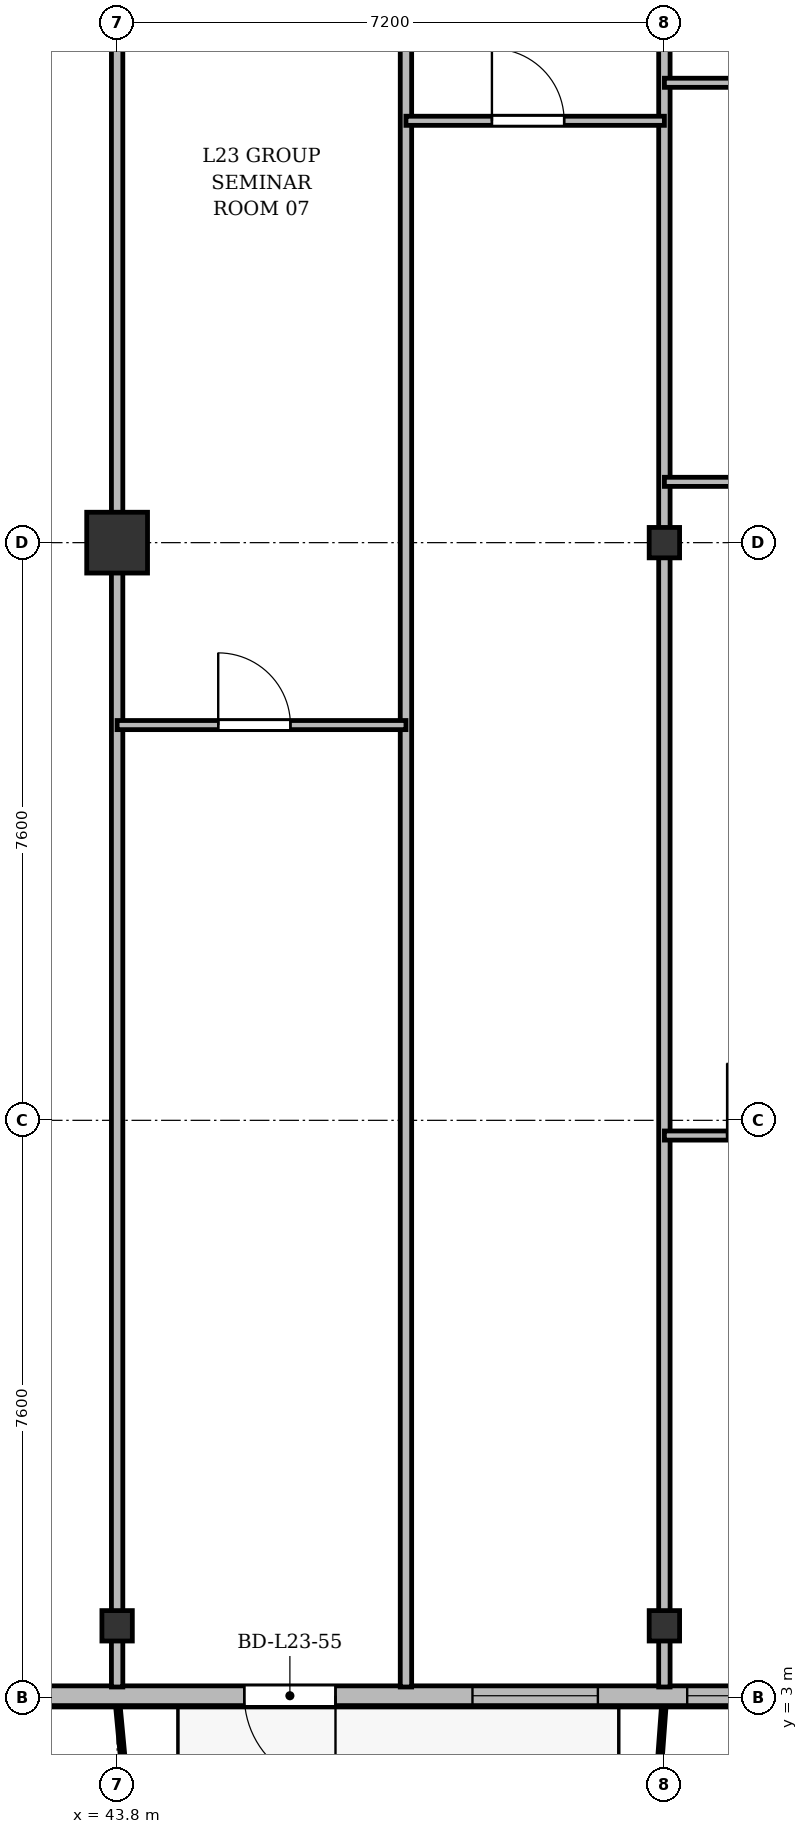
"""IFC4 building model, lengths in metres.
Left out: names, types, materials, properties, quantities, classifications, styles, units other than length and angle.
Written with IfcOpenShell. Run it as: python <this file> out.ifc"""

import sys

from ifc_helpers import new_model, si_unit, direction, frame, frame_2d, origin, origin_2d, place, context, subcontext, project, spatial, rectangle, i_section, extrude, source, transform, mapped, element, fill, save


model = new_model("IFC4")
c1 = context("Model", 3, precision=1e-05, world=origin(), true_north=direction((0.0, 1.0)))
c2 = subcontext(c1, "Body", "Model", "MODEL_VIEW")
j1 = project(units=[si_unit("LENGTHUNIT", "METRE"), si_unit("PLANEANGLEUNIT", "RADIAN")], contexts=[c1])
p1 = place(None, origin())
s1 = spatial("IfcSite", under=j1, at=p1, CompositionType="ELEMENT")
p2 = place(p1, origin())
s2 = spatial("IfcBuilding", under=s1, at=p2, CompositionType="ELEMENT")
p3 = place(p2, frame((0.0, 0.0, 92.5)))
s3 = spatial("IfcBuildingStorey", under=s2, at=p3, CompositionType="ELEMENT", Elevation=92.5)
m1 = source(origin(), c2, "Body", "SweptSolid", [
    extrude(i_section(OverallWidth=0.4, OverallDepth=0.4, WebThickness=0.022, FlangeThickness=0.035, at=origin_2d()), origin(), (0.0, 0.0, 1.0), 3.6),
])
p4 = place(p3, frame((43.8, 3.95, 0.0), z_axis=(0.0, 0.0, 1.0), x_axis=(1.0, 0.0, 0.0)))
e1 = element("IfcColumn", 1, at=p4, inside=s3, PredefinedType="COLUMN", context=c2, shape_type="MappedRepresentation", body=[
    mapped(m1, transform((0.0, 0.0, 0.0), x_axis=(1.0, 0.0, 0.0), y_axis=(0.0, 1.0, 0.0), z_axis=(0.0, 0.0, 1.0), scale=1.0)),
])
m2 = source(origin(), c2, "Body", "SweptSolid", [
    extrude(rectangle(XDim=0.8, YDim=0.8, at=origin_2d()), origin(), (0.0, 0.0, 1.0), 3.6),
])
p5 = place(p3, frame((43.8, 18.2, 0.0), z_axis=(0.0, 0.0, 1.0), x_axis=(1.0, 0.0, 0.0)))
e2 = element("IfcColumn", 2, at=p5, inside=s3, PredefinedType="COLUMN", context=c2, shape_type="MappedRepresentation", body=[
    mapped(m2, transform((0.0, 0.0, 0.0), x_axis=(1.0, 0.0, 0.0), y_axis=(0.0, 1.0, 0.0), z_axis=(0.0, 0.0, 1.0), scale=1.0)),
])
for number, where, z_axis, x_axis in (
    (3, (51.0, 3.95, 0.0), (0.0, 0.0, 1.0), (1.0, 0.0, 0.0)),
    (4, (51.0, 18.2, 0.0), (0.0, 0.0, 1.0), (1.0, 0.0, 0.0)),
):
    element("IfcColumn", number, at=place(p3, frame(where, z_axis=z_axis, x_axis=x_axis)), inside=s3, PredefinedType="COLUMN", context=c2, shape_type="MappedRepresentation", body=[
        mapped(m1, transform((0.0, 0.0, 0.0), x_axis=(1.0, 0.0, 0.0), y_axis=(0.0, 1.0, 0.0), z_axis=(0.0, 0.0, 1.0), scale=1.0)),
    ])
p6 = place(p3, frame((66.9, 3.03, 0.0), z_axis=(0.0, 0.0, 1.0), x_axis=(-1.0, 0.0, 0.0)))
e5 = element("IfcWall", 5, at=p6, inside=s3, PredefinedType="SOLIDWALL", context=c2, shape_type="SweptSolid", body=[
    extrude(rectangle(XDim=59.4, YDim=0.26, at=frame_2d((29.7, 0.0))), origin(), (0.0, 0.0, 1.0), 3.34),
])
p7 = place(p6, frame((2.175, 0.0, 0.9)))
e6 = element("IfcOpeningElement", 6, at=p7, cuts=e5, PredefinedType="OPENING", context=c2, shape_type="SweptSolid", body=[
    extrude(rectangle(XDim=1.65, YDim=1.85, at=frame_2d((0.825, 0.925))), frame((0.0, 0.14, 0.0), z_axis=(0.0, -1.0, 0.0), x_axis=(1.0, 0.0, 0.0)), (0.0, 0.0, 1.0), 0.28),
])
p8 = place(p6, frame((5.5, 0.0, 0.9)))
e7 = element("IfcOpeningElement", 7, at=p8, cuts=e5, PredefinedType="OPENING", context=c2, shape_type="SweptSolid", body=[
    extrude(rectangle(XDim=1.8, YDim=1.8, at=frame_2d((0.9, 0.9))), frame((0.0, 0.14, 0.0), z_axis=(0.0, -1.0, 0.0), x_axis=(1.0, 0.0, 0.0)), (0.0, 0.0, 1.0), 0.28),
])
p9 = place(p6, frame((8.65, 0.0, 0.9)))
e8 = element("IfcOpeningElement", 8, at=p9, cuts=e5, PredefinedType="OPENING", context=c2, shape_type="SweptSolid", body=[
    extrude(rectangle(XDim=1.5, YDim=1.75, at=frame_2d((0.75, 0.875))), frame((0.0, 0.14, 0.0), z_axis=(0.0, -1.0, 0.0), x_axis=(1.0, 0.0, 0.0)), (0.0, 0.0, 1.0), 0.28),
])
p10 = place(p6, frame((11.25, 0.0, 0.9)))
e9 = element("IfcOpeningElement", 9, at=p10, cuts=e5, PredefinedType="OPENING", context=c2, shape_type="SweptSolid", body=[
    extrude(rectangle(XDim=1.5, YDim=1.75, at=frame_2d((0.75, 0.875))), frame((0.0, 0.14, 0.0), z_axis=(0.0, -1.0, 0.0), x_axis=(1.0, 0.0, 0.0)), (0.0, 0.0, 1.0), 0.28),
])
p11 = place(p6, frame((13.6, 0.0, 0.9)))
e10 = element("IfcOpeningElement", 10, at=p11, cuts=e5, PredefinedType="OPENING", context=c2, shape_type="SweptSolid", body=[
    extrude(rectangle(XDim=2.0, YDim=1.95, at=frame_2d((1.0, 0.975))), frame((0.0, 0.14, 0.0), z_axis=(0.0, -1.0, 0.0), x_axis=(1.0, 0.0, 0.0)), (0.0, 0.0, 1.0), 0.28),
])
p12 = place(p6, frame((16.775, 0.0, 0.9)))
e11 = element("IfcOpeningElement", 11, at=p12, cuts=e5, PredefinedType="OPENING", context=c2, shape_type="SweptSolid", body=[
    extrude(rectangle(XDim=1.65, YDim=1.85, at=frame_2d((0.825, 0.925))), frame((0.0, 0.14, 0.0), z_axis=(0.0, -1.0, 0.0), x_axis=(1.0, 0.0, 0.0)), (0.0, 0.0, 1.0), 0.28),
])
p13 = place(p6, frame((20.227, 0.0, 0.0)))
e12 = element("IfcOpeningElement", 12, at=p13, cuts=e5, PredefinedType="OPENING", context=c2, shape_type="SweptSolid", body=[
    extrude(rectangle(XDim=1.2, YDim=2.2, at=frame_2d((0.6, 1.1))), frame((0.0, 0.14, 0.0), z_axis=(0.0, -1.0, 0.0), x_axis=(1.0, 0.0, 0.0)), (0.0, 0.0, 1.0), 0.28),
])
p14 = place(p6, frame((28.6, 0.0, 0.9)))
e13 = element("IfcOpeningElement", 13, at=p14, cuts=e5, PredefinedType="OPENING", context=c2, shape_type="SweptSolid", body=[
    extrude(rectangle(XDim=2.2, YDim=1.8, at=frame_2d((1.1, 0.9))), frame((0.0, 0.14, 0.0), z_axis=(0.0, -1.0, 0.0), x_axis=(1.0, 0.0, 0.0)), (0.0, 0.0, 1.0), 0.28),
])
p15 = place(p6, frame((36.75, 0.0, 0.9)))
e14 = element("IfcOpeningElement", 14, at=p15, cuts=e5, PredefinedType="OPENING", context=c2, shape_type="SweptSolid", body=[
    extrude(rectangle(XDim=1.5, YDim=1.75, at=frame_2d((0.75, 0.875))), frame((0.0, 0.14, 0.0), z_axis=(0.0, -1.0, 0.0), x_axis=(1.0, 0.0, 0.0)), (0.0, 0.0, 1.0), 0.28),
])
p16 = place(p6, frame((39.15, 0.0, 0.9)))
e15 = element("IfcOpeningElement", 15, at=p16, cuts=e5, PredefinedType="OPENING", context=c2, shape_type="SweptSolid", body=[
    extrude(rectangle(XDim=1.5, YDim=1.75, at=frame_2d((0.75, 0.875))), frame((0.0, 0.14, 0.0), z_axis=(0.0, -1.0, 0.0), x_axis=(1.0, 0.0, 0.0)), (0.0, 0.0, 1.0), 0.28),
])
p17 = place(p6, frame((41.475, 0.0, 0.9)))
e16 = element("IfcOpeningElement", 16, at=p17, cuts=e5, PredefinedType="OPENING", context=c2, shape_type="SweptSolid", body=[
    extrude(rectangle(XDim=1.65, YDim=1.85, at=frame_2d((0.825, 0.925))), frame((0.0, 0.14, 0.0), z_axis=(0.0, -1.0, 0.0), x_axis=(1.0, 0.0, 0.0)), (0.0, 0.0, 1.0), 0.28),
])
p18 = place(p6, frame((45.36, 0.0, 0.0)))
e17 = element("IfcOpeningElement", 17, at=p18, cuts=e5, PredefinedType="OPENING", context=c2, shape_type="SweptSolid", body=[
    extrude(rectangle(XDim=1.2, YDim=2.2, at=frame_2d((0.6, 1.1))), frame((0.0, 0.14, 0.0), z_axis=(0.0, -1.0, 0.0), x_axis=(1.0, 0.0, 0.0)), (0.0, 0.0, 1.0), 0.28),
])
p19 = place(p6, frame((48.2, 0.0, 0.9)))
e18 = element("IfcOpeningElement", 18, at=p19, cuts=e5, PredefinedType="OPENING", context=c2, shape_type="SweptSolid", body=[
    extrude(rectangle(XDim=2.2, YDim=1.8, at=frame_2d((1.1, 0.9))), frame((0.0, 0.14, 0.0), z_axis=(0.0, -1.0, 0.0), x_axis=(1.0, 0.0, 0.0)), (0.0, 0.0, 1.0), 0.28),
])
p20 = place(p6, frame((52.25, 0.0, 0.9)))
e19 = element("IfcOpeningElement", 19, at=p20, cuts=e5, PredefinedType="OPENING", context=c2, shape_type="SweptSolid", body=[
    extrude(rectangle(XDim=1.5, YDim=1.75, at=frame_2d((0.75, 0.875))), frame((0.0, 0.14, 0.0), z_axis=(0.0, -1.0, 0.0), x_axis=(1.0, 0.0, 0.0)), (0.0, 0.0, 1.0), 0.28),
])
p21 = place(p6, frame((55.4, 0.0, 0.9)))
e20 = element("IfcOpeningElement", 20, at=p21, cuts=e5, PredefinedType="OPENING", context=c2, shape_type="SweptSolid", body=[
    extrude(rectangle(XDim=2.0, YDim=1.95, at=frame_2d((1.0, 0.975))), frame((0.0, 0.14, 0.0), z_axis=(0.0, -1.0, 0.0), x_axis=(1.0, 0.0, 0.0)), (0.0, 0.0, 1.0), 0.28),
])
p22 = place(p3, frame((43.8, 3.145, 0.0), z_axis=(0.0, 0.0, 1.0), x_axis=(0.0, 1.0, 0.0)))
e21 = element("IfcWall", 21, at=p22, inside=s3, PredefinedType="PARTITIONING", context=c2, shape_type="SweptSolid", body=[
    extrude(rectangle(XDim=24.455, YDim=0.15, at=frame_2d((12.228, 0.0))), origin(), (0.0, 0.0, 1.0), 2.84),
])
p23 = place(p3, frame((47.6, 3.145, 0.0), z_axis=(0.0, 0.0, 1.0), x_axis=(0.0, 1.0, 0.0)))
e22 = element("IfcWall", 22, at=p23, inside=s3, PredefinedType="PARTITIONING", context=c2, shape_type="SweptSolid", body=[
    extrude(rectangle(XDim=24.455, YDim=0.15, at=frame_2d((12.228, 0.0))), origin(), (0.0, 0.0, 1.0), 2.752),
])
p24 = place(p3, frame((51.0, 3.145, 0.0), z_axis=(0.0, 0.0, 1.0), x_axis=(0.0, 1.0, 0.0)))
e23 = element("IfcWall", 23, at=p24, inside=s3, PredefinedType="PARTITIONING", context=c2, shape_type="SweptSolid", body=[
    extrude(rectangle(XDim=24.455, YDim=0.15, at=frame_2d((12.228, 0.0))), origin(), (0.0, 0.0, 1.0), 2.84),
])
p25 = place(p3, frame((43.8, 15.8, 0.0), z_axis=(0.0, 0.0, 1.0), x_axis=(1.0, 0.0, 0.0)))
e24 = element("IfcWall", 24, at=p25, inside=s3, PredefinedType="PARTITIONING", context=c2, shape_type="SweptSolid", body=[
    extrude(rectangle(XDim=3.8, YDim=0.12, at=frame_2d((1.9, 0.0))), origin(), (0.0, 0.0, 1.0), 2.84),
])
p26 = place(p25, frame((1.33, 0.0, 0.0)))
e25 = element("IfcOpeningElement", 25, at=p26, cuts=e24, PredefinedType="OPENING", context=c2, shape_type="SweptSolid", body=[
    extrude(rectangle(XDim=0.95, YDim=2.15, at=frame_2d((0.475, 1.075))), frame((0.0, 0.07, 0.0), z_axis=(0.0, -1.0, 0.0), x_axis=(1.0, 0.0, 0.0)), (0.0, 0.0, 1.0), 0.14),
])
p27 = place(p3, frame((47.6, 23.75, 0.0), z_axis=(0.0, 0.0, 1.0), x_axis=(1.0, 0.0, 0.0)))
e26 = element("IfcWall", 26, at=p27, inside=s3, PredefinedType="PARTITIONING", context=c2, shape_type="SweptSolid", body=[
    extrude(rectangle(XDim=3.4, YDim=0.12, at=frame_2d((1.7, 0.0))), origin(), (0.0, 0.0, 1.0), 2.84),
])
p28 = place(p27, frame((1.131, 0.0, 0.0)))
e27 = element("IfcOpeningElement", 27, at=p28, cuts=e26, PredefinedType="OPENING", context=c2, shape_type="SweptSolid", body=[
    extrude(rectangle(XDim=0.95, YDim=2.15, at=frame_2d((0.475, 1.075))), frame((0.0, 0.07, 0.0), z_axis=(0.0, -1.0, 0.0), x_axis=(1.0, 0.0, 0.0)), (0.0, 0.0, 1.0), 0.14),
])
p29 = place(p3, frame((51.0, 19.0, 0.0), z_axis=(0.0, 0.0, 1.0), x_axis=(1.0, 0.0, 0.0)))
e28 = element("IfcWall", 28, at=p29, inside=s3, PredefinedType="PARTITIONING", context=c2, shape_type="SweptSolid", body=[
    extrude(rectangle(XDim=7.8, YDim=0.12, at=frame_2d((3.9, 0.0))), origin(), (0.0, 0.0, 1.0), 2.84),
])
p30 = place(p29, frame((3.333, 0.0, 0.0)))
e29 = element("IfcOpeningElement", 29, at=p30, cuts=e28, PredefinedType="OPENING", context=c2, shape_type="SweptSolid", body=[
    extrude(rectangle(XDim=0.95, YDim=2.15, at=frame_2d((0.475, 1.075))), frame((0.0, 0.07, 0.0), z_axis=(0.0, -1.0, 0.0), x_axis=(1.0, 0.0, 0.0)), (0.0, 0.0, 1.0), 0.14),
])
p31 = place(p3, frame((51.0, 24.25, 0.0), z_axis=(0.0, 0.0, 1.0), x_axis=(1.0, 0.0, 0.0)))
e30 = element("IfcWall", 30, at=p31, inside=s3, PredefinedType="PARTITIONING", context=c2, shape_type="SweptSolid", body=[
    extrude(rectangle(XDim=2.4, YDim=0.12, at=frame_2d((1.2, 0.0))), origin(), (0.0, 0.0, 1.0), 2.84),
])
p32 = place(p3, frame((51.0, 10.4, 0.0), z_axis=(0.0, 0.0, 1.0), x_axis=(1.0, 0.0, 0.0)))
e31 = element("IfcWall", 31, at=p32, inside=s3, PredefinedType="PARTITIONING", context=c2, shape_type="SweptSolid", body=[
    extrude(rectangle(XDim=2.6, YDim=0.12, at=frame_2d((1.3, 0.0))), origin(), (0.0, 0.0, 1.0), 2.84),
])
p33 = place(p32, frame((0.825, 0.0, 0.0)))
e32 = element("IfcOpeningElement", 32, at=p33, cuts=e31, PredefinedType="OPENING", context=c2, shape_type="SweptSolid", body=[
    extrude(rectangle(XDim=0.95, YDim=2.15, at=frame_2d((0.475, 1.075))), frame((0.0, 0.07, 0.0), z_axis=(0.0, -1.0, 0.0), x_axis=(1.0, 0.0, 0.0)), (0.0, 0.0, 1.0), 0.14),
])
m3 = source(origin(), c2, "Body", "SweptSolid", [
    extrude(rectangle(XDim=2.0, YDim=1.95, at=frame_2d((1.0, 0.975))), frame((0.0, 0.03, 0.0), z_axis=(0.0, -1.0, 0.0), x_axis=(1.0, 0.0, 0.0)), (0.0, 0.0, 1.0), 0.06),
])
p34 = place(p11, origin())
e33 = element("IfcWindow", 33, at=p34, inside=s3, PartitioningType="SINGLE_PANEL", PredefinedType="WINDOW", context=c2, shape_type="MappedRepresentation", body=[
    mapped(m3, transform((0.0, 0.0, 0.0), x_axis=(1.0, 0.0, 0.0), y_axis=(0.0, 1.0, 0.0), z_axis=(0.0, 0.0, 1.0), scale=1.0)),
])
fill(e10, e33)
m4 = source(origin(), c2, "Body", "SweptSolid", [
    extrude(rectangle(XDim=1.65, YDim=1.85, at=frame_2d((0.825, 0.925))), frame((0.0, 0.03, 0.0), z_axis=(0.0, -1.0, 0.0), x_axis=(1.0, 0.0, 0.0)), (0.0, 0.0, 1.0), 0.06),
])
p35 = place(p12, origin())
e34 = element("IfcWindow", 34, at=p35, inside=s3, PartitioningType="SINGLE_PANEL", PredefinedType="WINDOW", context=c2, shape_type="MappedRepresentation", body=[
    mapped(m4, transform((0.0, 0.0, 0.0), x_axis=(1.0, 0.0, 0.0), y_axis=(0.0, 1.0, 0.0), z_axis=(0.0, 0.0, 1.0), scale=1.0)),
])
fill(e11, e34)
m5 = source(origin(), c2, "Body", "SweptSolid", [
    extrude(rectangle(XDim=1.2, YDim=2.2, at=frame_2d((0.6, 1.1))), frame((0.0, 0.025, 0.0), z_axis=(0.0, -1.0, 0.0), x_axis=(1.0, 0.0, 0.0)), (0.0, 0.0, 1.0), 0.05),
])
p36 = place(p13, origin())
e35 = element("IfcDoor", 35, at=p36, inside=s3, OperationType="SINGLE_SWING_LEFT", PredefinedType="DOOR", context=c2, shape_type="MappedRepresentation", body=[
    mapped(m5, transform((0.0, 0.0, 0.0), x_axis=(1.0, 0.0, 0.0), y_axis=(0.0, 1.0, 0.0), z_axis=(0.0, 0.0, 1.0), scale=1.0)),
])
fill(e12, e35)
m6 = source(origin(), c2, "Body", "SweptSolid", [
    extrude(rectangle(XDim=0.95, YDim=2.15, at=frame_2d((0.475, 1.075))), frame((0.0, 0.025, 0.0), z_axis=(0.0, -1.0, 0.0), x_axis=(1.0, 0.0, 0.0)), (0.0, 0.0, 1.0), 0.05),
])
p37 = place(p26, origin())
e36 = element("IfcDoor", 36, at=p37, inside=s3, OperationType="SINGLE_SWING_LEFT", PredefinedType="DOOR", context=c2, shape_type="MappedRepresentation", body=[
    mapped(m6, transform((0.0, 0.0, 0.0), x_axis=(1.0, 0.0, 0.0), y_axis=(0.0, 1.0, 0.0), z_axis=(0.0, 0.0, 1.0), scale=1.0)),
])
fill(e25, e36)
p38 = place(p28, origin())
e37 = element("IfcDoor", 37, at=p38, inside=s3, OperationType="SINGLE_SWING_LEFT", PredefinedType="DOOR", context=c2, shape_type="MappedRepresentation", body=[
    mapped(m6, transform((0.0, 0.0, 0.0), x_axis=(1.0, 0.0, 0.0), y_axis=(0.0, 1.0, 0.0), z_axis=(0.0, 0.0, 1.0), scale=1.0)),
])
fill(e27, e37)
p39 = place(p33, origin())
e38 = element("IfcDoor", 38, at=p39, inside=s3, OperationType="SINGLE_SWING_LEFT", PredefinedType="DOOR", context=c2, shape_type="MappedRepresentation", body=[
    mapped(m6, transform((0.0, 0.0, 0.0), x_axis=(1.0, 0.0, 0.0), y_axis=(0.0, 1.0, 0.0), z_axis=(0.0, 0.0, 1.0), scale=1.0)),
])
fill(e32, e38)
save(model, sys.argv[1])
